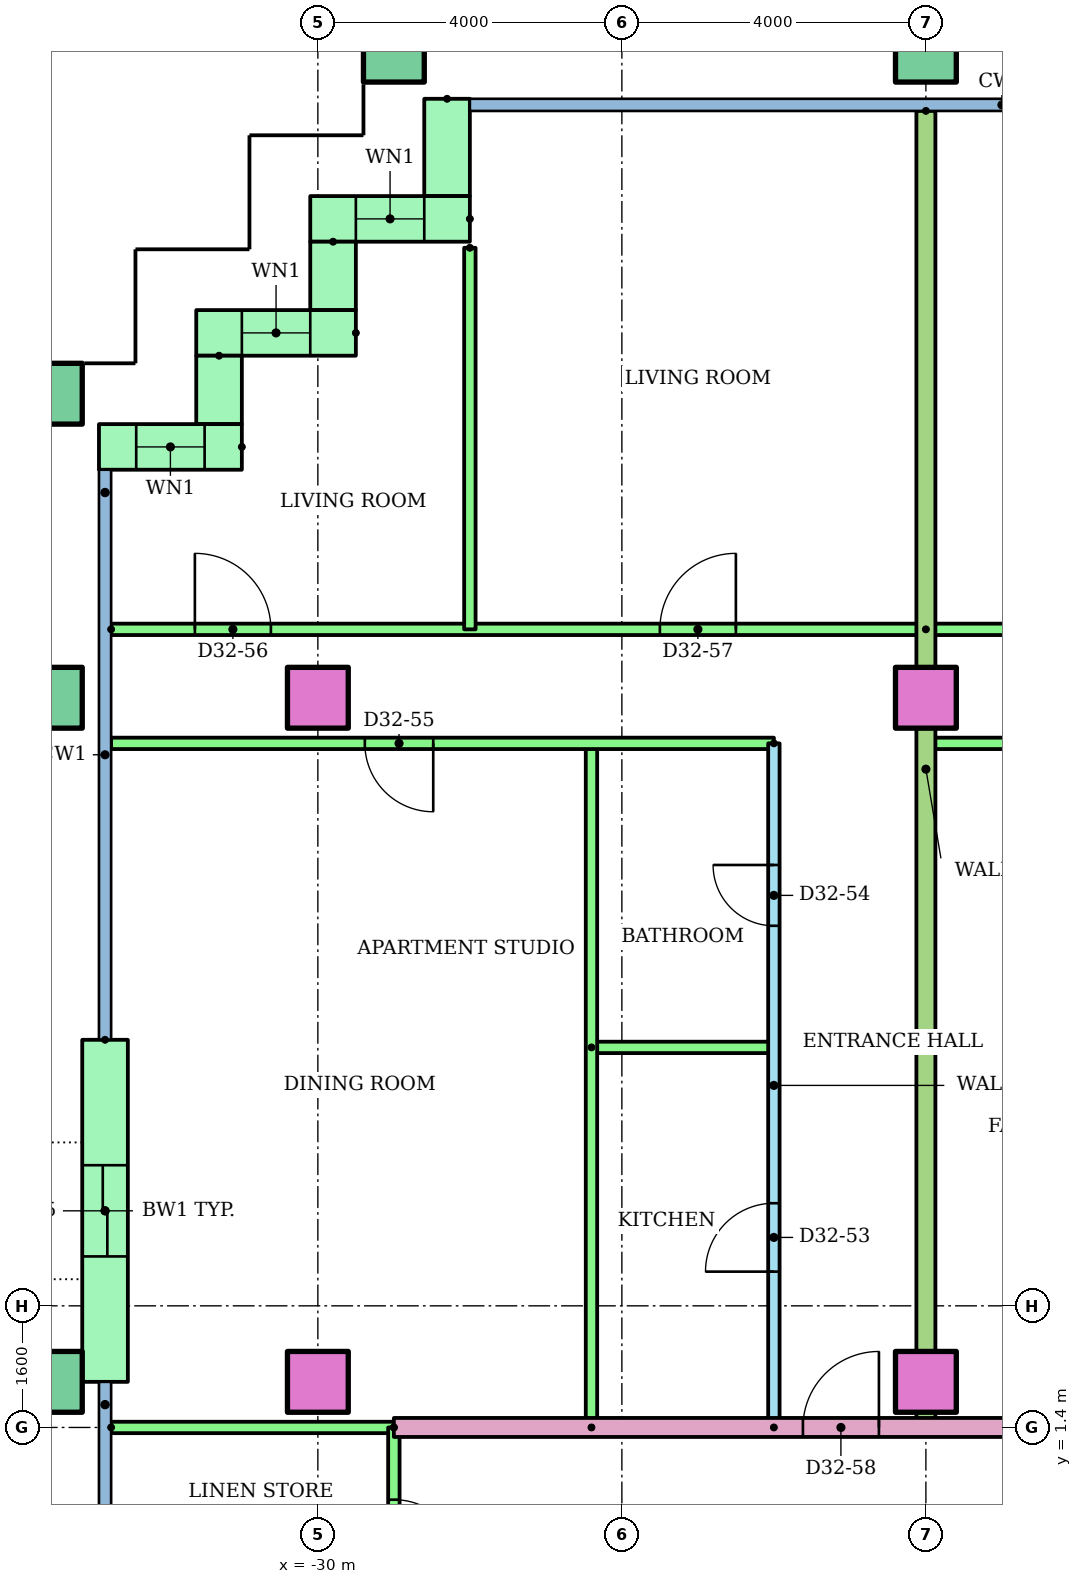
"""IFC4 building model, lengths in metres.
Left out: names, types, materials, properties, quantities, classifications, styles, units other than length and angle.
Written with IfcOpenShell. Run it as: python <this file> out.ifc"""

import sys

from ifc_helpers import new_model, si_unit, direction, frame, frame_2d, origin, origin_2d, place, context, subcontext, project, spatial, rectangle, hollow_rectangle, extrude, element, fill, save


model = new_model("IFC4")
c1 = context("Model", 3, precision=1e-05, world=origin(), true_north=direction((0.0, 1.0)))
c2 = subcontext(c1, "Body", "Model", "MODEL_VIEW")
j1 = project(units=[si_unit("LENGTHUNIT", "METRE"), si_unit("PLANEANGLEUNIT", "RADIAN")], contexts=[c1])
p1 = place(None, origin())
s1 = spatial("IfcSite", under=j1, at=p1, CompositionType="ELEMENT")
p2 = place(p1, origin())
s2 = spatial("IfcBuilding", under=s1, at=p2, CompositionType="ELEMENT")
p3 = place(p2, frame((0.0, 0.0, 126.2)))
s3 = spatial("IfcBuildingStorey", under=s2, at=p3, CompositionType="ELEMENT", Elevation=126.2)
p4 = place(p3, frame((-33.5, 2.0, 0.0)))
e1 = element("IfcColumn", 1, at=p4, inside=s3, PredefinedType="COLUMN", context=c2, shape_type="SweptSolid", body=[
    extrude(hollow_rectangle(XDim=0.8, YDim=0.8, WallThickness=0.04, at=origin_2d()), origin(), (0.0, 0.0, 1.0), 3.2),
])
for number, where in (
    (2, (-30.0, 2.0, 0.0)),
    (3, (-22.0, 2.0, 0.0)),
):
    element("IfcColumn", number, at=place(p3, frame(where)), inside=s3, PredefinedType="COLUMN", context=c2, shape_type="SweptSolid", body=[
        extrude(rectangle(XDim=0.8, YDim=0.8, at=origin_2d()), origin(), (0.0, 0.0, 1.0), 3.2),
    ])
p5 = place(p3, frame((-33.5, 11.0, 0.0)))
e4 = element("IfcColumn", 4, at=p5, inside=s3, PredefinedType="COLUMN", context=c2, shape_type="SweptSolid", body=[
    extrude(hollow_rectangle(XDim=0.8, YDim=0.8, WallThickness=0.04, at=origin_2d()), origin(), (0.0, 0.0, 1.0), 3.2),
])
for number, where in (
    (5, (-30.0, 11.0, 0.0)),
    (6, (-22.0, 11.0, 0.0)),
):
    element("IfcColumn", number, at=place(p3, frame(where)), inside=s3, PredefinedType="COLUMN", context=c2, shape_type="SweptSolid", body=[
        extrude(rectangle(XDim=0.8, YDim=0.8, at=origin_2d()), origin(), (0.0, 0.0, 1.0), 3.2),
    ])
for number, where in (
    (7, (-33.5, 15.0, 0.0)),
    (8, (-29.0, 19.5, 0.0)),
    (9, (-22.0, 19.5, 0.0)),
):
    element("IfcColumn", number, at=place(p3, frame(where)), inside=s3, PredefinedType="COLUMN", context=c2, shape_type="SweptSolid", body=[
        extrude(hollow_rectangle(XDim=0.8, YDim=0.8, WallThickness=0.04, at=origin_2d()), origin(), (0.0, 0.0, 1.0), 3.2),
    ])
p6 = place(p3, frame((-28.3, 18.88, 0.0), z_axis=(0.0, 0.0, 1.0), x_axis=(0.0, -1.0, 0.0)))
e10 = element("IfcWall", 10, at=p6, inside=s3, PredefinedType="STANDARD", context=c2, shape_type="SweptSolid", body=[
    extrude(rectangle(XDim=1.28, YDim=0.6, at=frame_2d((0.64, 0.0))), origin(), (0.0, 0.0, 1.0), 2.92),
])
p7 = place(p3, frame((-28.0, 17.3, 0.0), z_axis=(0.0, 0.0, 1.0), x_axis=(-1.0, 0.0, 0.0)))
e11 = element("IfcWall", 11, at=p7, inside=s3, PredefinedType="STANDARD", context=c2, shape_type="SweptSolid", body=[
    extrude(rectangle(XDim=2.1, YDim=0.6, at=frame_2d((1.05, 0.0))), origin(), (0.0, 0.0, 1.0), 2.92),
])
p8 = place(p7, frame((0.6, 0.0, 0.9)))
e12 = element("IfcOpeningElement", 12, at=p8, cuts=e11, PredefinedType="OPENING", context=c2, shape_type="SweptSolid", body=[
    extrude(rectangle(XDim=0.9, YDim=1.5, at=frame_2d((0.45, 0.75))), frame((0.0, 0.31, 0.0), z_axis=(0.0, -1.0, 0.0), x_axis=(1.0, 0.0, 0.0)), (0.0, 0.0, 1.0), 0.62),
])
p9 = place(p3, frame((-29.8, 17.0, 0.0), z_axis=(0.0, 0.0, 1.0), x_axis=(0.0, -1.0, 0.0)))
e13 = element("IfcWall", 13, at=p9, inside=s3, PredefinedType="STANDARD", context=c2, shape_type="SweptSolid", body=[
    extrude(rectangle(XDim=0.9, YDim=0.6, at=frame_2d((0.45, 0.0))), origin(), (0.0, 0.0, 1.0), 2.92),
])
p10 = place(p3, frame((-29.5, 15.8, 0.0), z_axis=(0.0, 0.0, 1.0), x_axis=(-1.0, 0.0, 0.0)))
e14 = element("IfcWall", 14, at=p10, inside=s3, PredefinedType="STANDARD", context=c2, shape_type="SweptSolid", body=[
    extrude(rectangle(XDim=2.1, YDim=0.6, at=frame_2d((1.05, 0.0))), origin(), (0.0, 0.0, 1.0), 2.92),
])
p11 = place(p10, frame((0.6, 0.0, 0.9)))
e15 = element("IfcOpeningElement", 15, at=p11, cuts=e14, PredefinedType="OPENING", context=c2, shape_type="SweptSolid", body=[
    extrude(rectangle(XDim=0.9, YDim=1.5, at=frame_2d((0.45, 0.75))), frame((0.0, 0.31, 0.0), z_axis=(0.0, -1.0, 0.0), x_axis=(1.0, 0.0, 0.0)), (0.0, 0.0, 1.0), 0.62),
])
p12 = place(p3, frame((-31.3, 15.5, 0.0), z_axis=(0.0, 0.0, 1.0), x_axis=(0.0, -1.0, 0.0)))
e16 = element("IfcWall", 16, at=p12, inside=s3, PredefinedType="STANDARD", context=c2, shape_type="SweptSolid", body=[
    extrude(rectangle(XDim=0.9, YDim=0.6, at=frame_2d((0.45, 0.0))), origin(), (0.0, 0.0, 1.0), 2.92),
])
p13 = place(p3, frame((-31.0, 14.3, 0.0), z_axis=(0.0, 0.0, 1.0), x_axis=(-1.0, 0.0, 0.0)))
e17 = element("IfcWall", 17, at=p13, inside=s3, PredefinedType="STANDARD", context=c2, shape_type="SweptSolid", body=[
    extrude(rectangle(XDim=1.88, YDim=0.6, at=frame_2d((0.94, 0.0))), origin(), (0.0, 0.0, 1.0), 2.92),
])
p14 = place(p13, frame((0.49, 0.0, 0.9)))
e18 = element("IfcOpeningElement", 18, at=p14, cuts=e17, PredefinedType="OPENING", context=c2, shape_type="SweptSolid", body=[
    extrude(rectangle(XDim=0.9, YDim=1.5, at=frame_2d((0.45, 0.75))), frame((0.0, 0.31, 0.0), z_axis=(0.0, -1.0, 0.0), x_axis=(1.0, 0.0, 0.0)), (0.0, 0.0, 1.0), 0.62),
])
p15 = place(p3, frame((-32.8, 6.5, 0.0), z_axis=(0.0, 0.0, 1.0), x_axis=(0.0, -1.0, 0.0)))
e19 = element("IfcWall", 19, at=p15, inside=s3, PredefinedType="STANDARD", context=c2, shape_type="SweptSolid", body=[
    extrude(rectangle(XDim=4.5, YDim=0.6, at=frame_2d((2.25, 0.0))), origin(), (0.0, 0.0, 1.0), 2.92),
])
p16 = place(p15, frame((1.65, 0.0, 0.0)))
e20 = element("IfcOpeningElement", 20, at=p16, cuts=e19, PredefinedType="OPENING", context=c2, shape_type="SweptSolid", body=[
    extrude(rectangle(XDim=1.2, YDim=2.1, at=frame_2d((0.6, 1.05))), frame((0.0, 0.31, 0.0), z_axis=(0.0, -1.0, 0.0), x_axis=(1.0, 0.0, 0.0)), (0.0, 0.0, 1.0), 0.62),
])
p17 = place(p3, frame((-24.0, 1.4, 0.0), z_axis=(0.0, 0.0, 1.0), x_axis=(0.0, 1.0, 0.0)))
e21 = element("IfcWall", 21, at=p17, inside=s3, PredefinedType="PARTITIONING", context=c2, shape_type="SweptSolid", body=[
    extrude(rectangle(XDim=9.0, YDim=0.15, at=frame_2d((4.5, 0.0))), origin(), (0.0, 0.0, 1.0), 2.4),
])
p18 = place(p17, frame((2.05, 0.0, 0.0)))
e22 = element("IfcOpeningElement", 22, at=p18, cuts=e21, PredefinedType="OPENING", context=c2, shape_type="SweptSolid", body=[
    extrude(rectangle(XDim=0.9, YDim=2.1, at=frame_2d((0.45, 1.05))), frame((0.0, 0.085, 0.0), z_axis=(0.0, -1.0, 0.0), x_axis=(1.0, 0.0, 0.0)), (0.0, 0.0, 1.0), 0.17),
])
p19 = place(p17, frame((6.6, 0.0, 0.0)))
e23 = element("IfcOpeningElement", 23, at=p19, cuts=e21, PredefinedType="OPENING", context=c2, shape_type="SweptSolid", body=[
    extrude(rectangle(XDim=0.8, YDim=2.1, at=frame_2d((0.4, 1.05))), frame((0.0, 0.085, 0.0), z_axis=(0.0, -1.0, 0.0), x_axis=(1.0, 0.0, 0.0)), (0.0, 0.0, 1.0), 0.17),
])
p20 = place(p3, frame((-26.4, 6.4, 0.0)))
e24 = element("IfcWall", 24, at=p20, inside=s3, PredefinedType="PARTITIONING", context=c2, shape_type="SweptSolid", body=[
    extrude(rectangle(XDim=2.4, YDim=0.15, at=frame_2d((1.2, 0.0))), origin(), (0.0, 0.0, 1.0), 2.4),
])
p21 = place(p3, frame((-26.4, 1.4, 0.0), z_axis=(0.0, 0.0, 1.0), x_axis=(0.0, 1.0, 0.0)))
e25 = element("IfcWall", 25, at=p21, inside=s3, PredefinedType="PARTITIONING", context=c2, shape_type="SweptSolid", body=[
    extrude(rectangle(XDim=9.0, YDim=0.15, at=frame_2d((4.5, 0.0))), origin(), (0.0, 0.0, 1.0), 2.4),
])
p22 = place(p3, frame((-24.0, 10.4, 0.0), z_axis=(0.0, 0.0, 1.0), x_axis=(-1.0, 0.0, 0.0)))
e26 = element("IfcWall", 26, at=p22, inside=s3, PredefinedType="PARTITIONING", context=c2, shape_type="SweptSolid", body=[
    extrude(rectangle(XDim=8.72, YDim=0.15, at=frame_2d((4.36, 0.0))), origin(), (0.0, 0.0, 1.0), 2.4),
])
p23 = place(p22, frame((4.482, 0.0, 0.0)))
e27 = element("IfcOpeningElement", 27, at=p23, cuts=e26, PredefinedType="OPENING", context=c2, shape_type="SweptSolid", body=[
    extrude(rectangle(XDim=0.9, YDim=2.1, at=frame_2d((0.45, 1.05))), frame((0.0, 0.085, 0.0), z_axis=(0.0, -1.0, 0.0), x_axis=(1.0, 0.0, 0.0)), (0.0, 0.0, 1.0), 0.17),
])
p24 = place(p3, frame((-32.72, 11.9, 0.0)))
e28 = element("IfcWall", 28, at=p24, inside=s3, PredefinedType="PARTITIONING", context=c2, shape_type="SweptSolid", body=[
    extrude(rectangle(XDim=10.72, YDim=0.15, at=frame_2d((5.36, 0.0))), origin(), (0.0, 0.0, 1.0), 2.4),
])
p25 = place(p24, frame((1.102, 0.0, 0.0)))
e29 = element("IfcOpeningElement", 29, at=p25, cuts=e28, PredefinedType="OPENING", context=c2, shape_type="SweptSolid", body=[
    extrude(rectangle(XDim=1.0, YDim=2.1, at=frame_2d((0.5, 1.05))), frame((0.0, 0.085, 0.0), z_axis=(0.0, -1.0, 0.0), x_axis=(1.0, 0.0, 0.0)), (0.0, 0.0, 1.0), 0.17),
])
p26 = place(p24, frame((7.22, 0.0, 0.0)))
e30 = element("IfcOpeningElement", 30, at=p26, cuts=e28, PredefinedType="OPENING", context=c2, shape_type="SweptSolid", body=[
    extrude(rectangle(XDim=1.0, YDim=2.1, at=frame_2d((0.5, 1.05))), frame((0.0, 0.085, 0.0), z_axis=(0.0, -1.0, 0.0), x_axis=(1.0, 0.0, 0.0)), (0.0, 0.0, 1.0), 0.17),
])
p27 = place(p3, frame((-28.0, 16.92, 0.0), z_axis=(0.0, 0.0, 1.0), x_axis=(0.0, -1.0, 0.0)))
e31 = element("IfcWall", 31, at=p27, inside=s3, PredefinedType="PARTITIONING", context=c2, shape_type="SweptSolid", body=[
    extrude(rectangle(XDim=5.02, YDim=0.15, at=frame_2d((2.51, 0.0))), origin(), (0.0, 0.0, 1.0), 2.4),
])
p28 = place(p3, frame((-16.0, 10.4, 0.0), z_axis=(0.0, 0.0, 1.0), x_axis=(-1.0, 0.0, 0.0)))
e32 = element("IfcWall", 32, at=p28, inside=s3, PredefinedType="PARTITIONING", context=c2, shape_type="SweptSolid", body=[
    extrude(rectangle(XDim=6.0, YDim=0.15, at=frame_2d((3.0, 0.0))), origin(), (0.0, 0.0, 1.0), 2.4),
])
p29 = place(p28, frame((3.75, 0.0, 0.0)))
e33 = element("IfcOpeningElement", 33, at=p29, cuts=e32, PredefinedType="OPENING", context=c2, shape_type="SweptSolid", body=[
    extrude(rectangle(XDim=0.9, YDim=2.1, at=frame_2d((0.45, 1.05))), frame((0.0, 0.085, 0.0), z_axis=(0.0, -1.0, 0.0), x_axis=(1.0, 0.0, 0.0)), (0.0, 0.0, 1.0), 0.17),
])
p30 = place(p3, frame((-22.0, 11.9, 0.0)))
e34 = element("IfcWall", 34, at=p30, inside=s3, PredefinedType="PARTITIONING", context=c2, shape_type="SweptSolid", body=[
    extrude(rectangle(XDim=8.0, YDim=0.15, at=frame_2d((4.0, 0.0))), origin(), (0.0, 0.0, 1.0), 2.4),
])
p31 = place(p30, frame((3.5, 0.0, 0.0)))
e35 = element("IfcOpeningElement", 35, at=p31, cuts=e34, PredefinedType="OPENING", context=c2, shape_type="SweptSolid", body=[
    extrude(rectangle(XDim=1.0, YDim=2.1, at=frame_2d((0.5, 1.05))), frame((0.0, 0.085, 0.0), z_axis=(0.0, -1.0, 0.0), x_axis=(1.0, 0.0, 0.0)), (0.0, 0.0, 1.0), 0.17),
])
p32 = place(p3, frame((-22.0, 18.721, 0.0), z_axis=(0.0, 0.0, 1.0), x_axis=(0.0, -1.0, 0.0)))
e36 = element("IfcWall", 36, at=p32, inside=s3, PredefinedType="PARTITIONING", context=c2, shape_type="SweptSolid", body=[
    extrude(rectangle(XDim=17.321, YDim=0.25, at=frame_2d((8.661, 0.0))), origin(), (0.0, 0.0, 1.0), 2.4),
])
p33 = place(p3, frame((-29.0, 1.4, 0.0)))
e37 = element("IfcWall", 37, at=p33, inside=s3, PredefinedType="PARTITIONING", context=c2, shape_type="SweptSolid", body=[
    extrude(rectangle(XDim=15.0, YDim=0.25, at=frame_2d((7.5, 0.0))), origin(), (0.0, 0.0, 1.0), 2.4),
])
p34 = place(p33, frame((5.382, 0.0, 0.0)))
e38 = element("IfcOpeningElement", 38, at=p34, cuts=e37, PredefinedType="OPENING", context=c2, shape_type="SweptSolid", body=[
    extrude(rectangle(XDim=1.0, YDim=2.1, at=frame_2d((0.5, 1.05))), frame((0.0, 0.135, 0.0), z_axis=(0.0, -1.0, 0.0), x_axis=(1.0, 0.0, 0.0)), (0.0, 0.0, 1.0), 0.27),
])
p35 = place(p33, frame((13.5, 0.0, 0.0)))
e39 = element("IfcOpeningElement", 39, at=p35, cuts=e37, PredefinedType="OPENING", context=c2, shape_type="SweptSolid", body=[
    extrude(rectangle(XDim=1.0, YDim=2.1, at=frame_2d((0.5, 1.05))), frame((0.0, 0.135, 0.0), z_axis=(0.0, -1.0, 0.0), x_axis=(1.0, 0.0, 0.0)), (0.0, 0.0, 1.0), 0.27),
])
p36 = place(p3, frame((-32.72, 1.4, 0.0)))
e40 = element("IfcWall", 40, at=p36, inside=s3, PredefinedType="PARTITIONING", context=c2, shape_type="SweptSolid", body=[
    extrude(rectangle(XDim=3.72, YDim=0.15, at=frame_2d((1.86, 0.0))), origin(), (0.0, 0.0, 1.0), 2.4),
])
p37 = place(p3, frame((-29.0, 1.4, 0.0), z_axis=(0.0, 0.0, 1.0), x_axis=(0.0, -1.0, 0.0)))
e41 = element("IfcWall", 41, at=p37, inside=s3, PredefinedType="PARTITIONING", context=c2, shape_type="SweptSolid", body=[
    extrude(rectangle(XDim=2.8, YDim=0.15, at=frame_2d((1.4, 0.0))), origin(), (0.0, 0.0, 1.0), 2.4),
])
p38 = place(p37, frame((0.95, 0.0, 0.0)))
e42 = element("IfcOpeningElement", 42, at=p38, cuts=e41, PredefinedType="OPENING", context=c2, shape_type="SweptSolid", body=[
    extrude(rectangle(XDim=0.9, YDim=2.1, at=frame_2d((0.45, 1.05))), frame((0.0, 0.085, 0.0), z_axis=(0.0, -1.0, 0.0), x_axis=(1.0, 0.0, 0.0)), (0.0, 0.0, 1.0), 0.17),
])
p39 = place(p8, origin())
e43 = element("IfcWindow", 43, at=p39, inside=s3, PartitioningType="SINGLE_PANEL", PredefinedType="WINDOW", context=c2, shape_type="SweptSolid", body=[
    extrude(rectangle(XDim=0.9, YDim=1.5, at=frame_2d((0.45, 0.75))), frame((0.0, 0.03, 0.0), z_axis=(0.0, -1.0, 0.0), x_axis=(1.0, 0.0, 0.0)), (0.0, 0.0, 1.0), 0.06),
])
fill(e12, e43)
p40 = place(p11, origin())
e44 = element("IfcWindow", 44, at=p40, inside=s3, PartitioningType="SINGLE_PANEL", PredefinedType="WINDOW", context=c2, shape_type="SweptSolid", body=[
    extrude(rectangle(XDim=0.9, YDim=1.5, at=frame_2d((0.45, 0.75))), frame((0.0, 0.03, 0.0), z_axis=(0.0, -1.0, 0.0), x_axis=(1.0, 0.0, 0.0)), (0.0, 0.0, 1.0), 0.06),
])
fill(e15, e44)
p41 = place(p14, origin())
e45 = element("IfcWindow", 45, at=p41, inside=s3, PartitioningType="SINGLE_PANEL", PredefinedType="WINDOW", context=c2, shape_type="SweptSolid", body=[
    extrude(rectangle(XDim=0.9, YDim=1.5, at=frame_2d((0.45, 0.75))), frame((0.0, 0.03, 0.0), z_axis=(0.0, -1.0, 0.0), x_axis=(1.0, 0.0, 0.0)), (0.0, 0.0, 1.0), 0.06),
])
fill(e18, e45)
p42 = place(p18, origin())
e46 = element("IfcDoor", 46, at=p42, inside=s3, OperationType="SINGLE_SWING_LEFT", PredefinedType="DOOR", context=c2, shape_type="SweptSolid", body=[
    extrude(rectangle(XDim=0.9, YDim=2.1, at=frame_2d((0.45, 1.05))), frame((0.0, 0.025, 0.0), z_axis=(0.0, -1.0, 0.0), x_axis=(1.0, 0.0, 0.0)), (0.0, 0.0, 1.0), 0.05),
])
fill(e22, e46)
p43 = place(p19, origin())
e47 = element("IfcDoor", 47, at=p43, inside=s3, OperationType="SINGLE_SWING_RIGHT", PredefinedType="DOOR", context=c2, shape_type="SweptSolid", body=[
    extrude(rectangle(XDim=0.8, YDim=2.1, at=frame_2d((0.4, 1.05))), frame((0.0, 0.025, 0.0), z_axis=(0.0, -1.0, 0.0), x_axis=(1.0, 0.0, 0.0)), (0.0, 0.0, 1.0), 0.05),
])
fill(e23, e47)
p44 = place(p23, origin())
e48 = element("IfcDoor", 48, at=p44, inside=s3, OperationType="SINGLE_SWING_LEFT", PredefinedType="DOOR", context=c2, shape_type="SweptSolid", body=[
    extrude(rectangle(XDim=0.9, YDim=2.1, at=frame_2d((0.45, 1.05))), frame((0.0, 0.025, 0.0), z_axis=(0.0, -1.0, 0.0), x_axis=(1.0, 0.0, 0.0)), (0.0, 0.0, 1.0), 0.05),
])
fill(e27, e48)
p45 = place(p25, origin())
e49 = element("IfcDoor", 49, at=p45, inside=s3, OperationType="SINGLE_SWING_LEFT", PredefinedType="DOOR", context=c2, shape_type="SweptSolid", body=[
    extrude(rectangle(XDim=1.0, YDim=2.1, at=frame_2d((0.5, 1.05))), frame((0.0, 0.025, 0.0), z_axis=(0.0, -1.0, 0.0), x_axis=(1.0, 0.0, 0.0)), (0.0, 0.0, 1.0), 0.05),
])
fill(e29, e49)
p46 = place(p26, origin())
e50 = element("IfcDoor", 50, at=p46, inside=s3, OperationType="SINGLE_SWING_RIGHT", PredefinedType="DOOR", context=c2, shape_type="SweptSolid", body=[
    extrude(rectangle(XDim=1.0, YDim=2.1, at=frame_2d((0.5, 1.05))), frame((0.0, 0.025, 0.0), z_axis=(0.0, -1.0, 0.0), x_axis=(1.0, 0.0, 0.0)), (0.0, 0.0, 1.0), 0.05),
])
fill(e30, e50)
p47 = place(p34, origin())
e51 = element("IfcDoor", 51, at=p47, inside=s3, OperationType="SINGLE_SWING_RIGHT", PredefinedType="DOOR", context=c2, shape_type="SweptSolid", body=[
    extrude(rectangle(XDim=1.0, YDim=2.1, at=frame_2d((0.5, 1.05))), frame((0.0, 0.025, 0.0), z_axis=(0.0, -1.0, 0.0), x_axis=(1.0, 0.0, 0.0)), (0.0, 0.0, 1.0), 0.05),
])
fill(e38, e51)
p48 = place(p38, origin())
e52 = element("IfcDoor", 52, at=p48, inside=s3, OperationType="SINGLE_SWING_RIGHT", PredefinedType="DOOR", context=c2, shape_type="SweptSolid", body=[
    extrude(rectangle(XDim=0.9, YDim=2.1, at=frame_2d((0.45, 1.05))), frame((0.0, 0.025, 0.0), z_axis=(0.0, -1.0, 0.0), x_axis=(1.0, 0.0, 0.0)), (0.0, 0.0, 1.0), 0.05),
])
fill(e42, e52)
p49 = place(p16, origin())
e53 = element("IfcDoor", 53, at=p49, inside=s3, OperationType="SLIDING_TO_LEFT", PredefinedType="DOOR", context=c2, shape_type="SweptSolid", body=[
    extrude(rectangle(XDim=1.2, YDim=2.1, at=frame_2d((0.6, 1.05))), frame((0.0, 0.025, 0.0), z_axis=(0.0, -1.0, 0.0), x_axis=(1.0, 0.0, 0.0)), (0.0, 0.0, 1.0), 0.05),
])
fill(e20, e53)
save(model, sys.argv[1])
